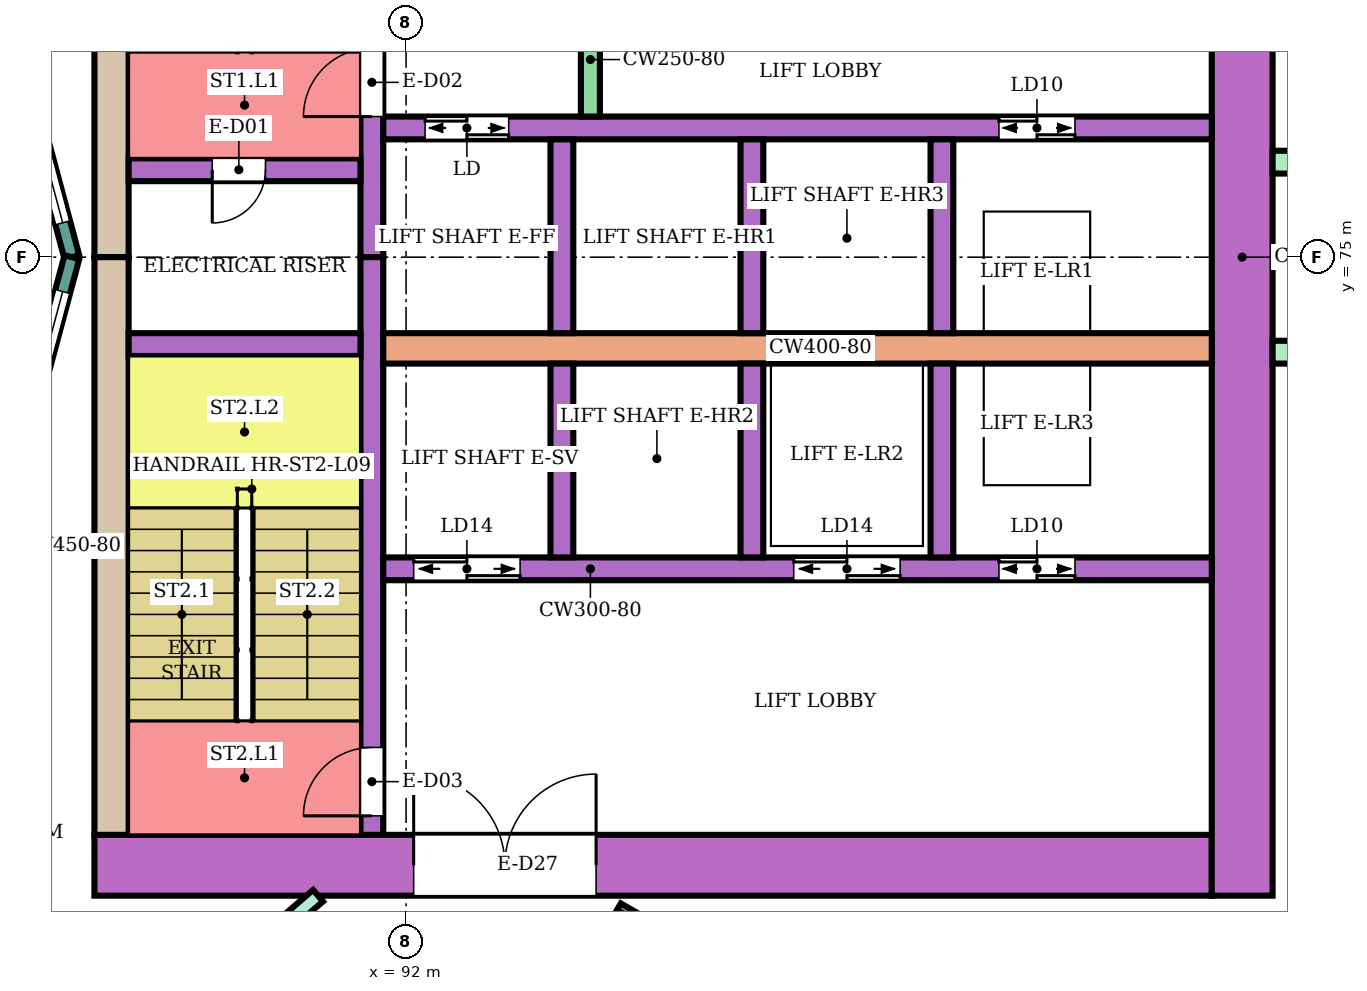
"""IFC4 building model, lengths in metres.
Left out: names, types, materials, properties, quantities, classifications, styles, units other than length and angle.
Written with IfcOpenShell. Run it as: python <this file> out.ifc"""

import sys

from ifc_helpers import new_model, si_unit, direction, frame, frame_2d, origin, place, context, subcontext, project, spatial, rectangle, extrude, element, fill, save


model = new_model("IFC4")
c1 = context("Model", 3, precision=1e-05, world=origin(), true_north=direction((0.0, 1.0)))
c2 = subcontext(c1, "Body", "Model", "MODEL_VIEW")
j1 = project(units=[si_unit("LENGTHUNIT", "METRE"), si_unit("PLANEANGLEUNIT", "RADIAN")], contexts=[c1])
p1 = place(None, origin())
s1 = spatial("IfcSite", under=j1, at=p1, CompositionType="ELEMENT")
p2 = place(p1, origin())
s2 = spatial("IfcBuilding", under=s1, at=p2, CompositionType="ELEMENT")
p3 = place(p2, frame((0.0, 0.0, 44.0)))
s3 = spatial("IfcBuildingStorey", under=s2, at=p3, CompositionType="ELEMENT", Elevation=44.0)
p4 = place(p3, frame((87.9, 67.0, 0.0), z_axis=(0.0, 0.0, 1.0), x_axis=(1.0, 0.0, 0.0)))
e1 = element("IfcWall", 1, at=p4, inside=s3, PredefinedType="SHEAR", context=c2, shape_type="SweptSolid", body=[
    extrude(rectangle(XDim=14.7, YDim=0.8, at=frame_2d((7.35, 0.0))), origin(), (0.0, 0.0, 1.0), 3.48),
])
p5 = place(p4, frame((4.2, 0.0, 0.0)))
e2 = element("IfcOpeningElement", 2, at=p5, cuts=e1, PredefinedType="OPENING", context=c2, shape_type="SweptSolid", body=[
    extrude(rectangle(XDim=2.4, YDim=2.4, at=frame_2d((1.2, 1.2))), frame((0.0, 0.41, 0.0), z_axis=(0.0, -1.0, 0.0), x_axis=(1.0, 0.0, 0.0)), (0.0, 0.0, 1.0), 0.82),
])
for number, where, z_axis, x_axis in (
    (3, (88.125, 75.0, 0.0), (0.0, 0.0, 1.0), (0.0, 1.0, 0.0)),
    (4, (88.125, 67.4, 0.0), (0.0, 0.0, 1.0), (0.0, 1.0, 0.0)),
):
    element("IfcWall", number, at=place(p3, frame(where, z_axis=z_axis, x_axis=x_axis)), inside=s3, PredefinedType="SHEAR", context=c2, shape_type="SweptSolid", body=[
        extrude(rectangle(XDim=7.6, YDim=0.45, at=frame_2d((3.8, 0.0))), origin(), (0.0, 0.0, 1.0), 3.48),
    ])
p6 = place(p3, frame((103.0, 66.6, 0.0), z_axis=(0.0, 0.0, 1.0), x_axis=(0.0, 1.0, 0.0)))
e5 = element("IfcWall", 5, at=p6, inside=s3, PredefinedType="SHEAR", context=c2, shape_type="SweptSolid", body=[
    extrude(rectangle(XDim=16.8, YDim=0.8, at=frame_2d((8.4, 0.0))), origin(), (0.0, 0.0, 1.0), 3.48),
])
p7 = place(p3, frame((91.55, 75.0, 0.0), z_axis=(0.0, 0.0, 1.0), x_axis=(0.0, 1.0, 0.0)))
e6 = element("IfcWall", 6, at=p7, inside=s3, PredefinedType="SHEAR", context=c2, shape_type="SweptSolid", body=[
    extrude(rectangle(XDim=7.6, YDim=0.3, at=frame_2d((3.8, 0.0))), origin(), (0.0, 0.0, 1.0), 3.48),
])
p8 = place(p7, frame((1.85, 0.0, 0.0)))
e7 = element("IfcOpeningElement", 7, at=p8, cuts=e6, PredefinedType="OPENING", context=c2, shape_type="SweptSolid", body=[
    extrude(rectangle(XDim=0.9, YDim=2.1, at=frame_2d((0.45, 1.05))), frame((0.0, 0.16, 0.0), z_axis=(0.0, -1.0, 0.0), x_axis=(1.0, 0.0, 0.0)), (0.0, 0.0, 1.0), 0.32),
])
p9 = place(p3, frame((91.55, 67.4, 0.0), z_axis=(0.0, 0.0, 1.0), x_axis=(0.0, 1.0, 0.0)))
e8 = element("IfcWall", 8, at=p9, inside=s3, PredefinedType="SHEAR", context=c2, shape_type="SweptSolid", body=[
    extrude(rectangle(XDim=7.6, YDim=0.3, at=frame_2d((3.8, 0.0))), origin(), (0.0, 0.0, 1.0), 3.48),
])
p10 = place(p9, frame((0.25, 0.0, 0.0)))
e9 = element("IfcOpeningElement", 9, at=p10, cuts=e8, PredefinedType="OPENING", context=c2, shape_type="SweptSolid", body=[
    extrude(rectangle(XDim=0.9, YDim=2.1, at=frame_2d((0.45, 1.05))), frame((0.0, 0.16, 0.0), z_axis=(0.0, -1.0, 0.0), x_axis=(1.0, 0.0, 0.0)), (0.0, 0.0, 1.0), 0.32),
])
p11 = place(p3, frame((88.35, 76.15, 0.0), z_axis=(0.0, 0.0, 1.0), x_axis=(1.0, 0.0, 0.0)))
e10 = element("IfcWall", 10, at=p11, inside=s3, PredefinedType="SHEAR", context=c2, shape_type="SweptSolid", body=[
    extrude(rectangle(XDim=3.05, YDim=0.3, at=frame_2d((1.525, 0.0))), origin(), (0.0, 0.0, 1.0), 3.48),
])
p12 = place(p11, frame((1.1, 0.0, 0.0)))
e11 = element("IfcOpeningElement", 11, at=p12, cuts=e10, PredefinedType="OPENING", context=c2, shape_type="SweptSolid", body=[
    extrude(rectangle(XDim=0.7, YDim=2.0, at=frame_2d((0.35, 1.0))), frame((0.0, 0.16, 0.0), z_axis=(0.0, -1.0, 0.0), x_axis=(1.0, 0.0, 0.0)), (0.0, 0.0, 1.0), 0.32),
])
p13 = place(p3, frame((88.35, 73.85, 0.0), z_axis=(0.0, 0.0, 1.0), x_axis=(1.0, 0.0, 0.0)))
e12 = element("IfcWall", 12, at=p13, inside=s3, PredefinedType="SHEAR", context=c2, shape_type="SweptSolid", body=[
    extrude(rectangle(XDim=3.05, YDim=0.3, at=frame_2d((1.525, 0.0))), origin(), (0.0, 0.0, 1.0), 3.48),
])
p14 = place(p3, frame((91.7, 76.7, 0.0), z_axis=(0.0, 0.0, 1.0), x_axis=(1.0, 0.0, 0.0)))
e13 = element("IfcWall", 13, at=p14, inside=s3, PredefinedType="SHEAR", context=c2, shape_type="SweptSolid", body=[
    extrude(rectangle(XDim=10.9, YDim=0.3, at=frame_2d((5.45, 0.0))), origin(), (0.0, 0.0, 1.0), 3.48),
])
p15 = place(p14, frame((0.55, 0.0, 0.0)))
e14 = element("IfcOpeningElement", 14, at=p15, cuts=e13, PredefinedType="OPENING", context=c2, shape_type="SweptSolid", body=[
    extrude(rectangle(XDim=1.1, YDim=2.1, at=frame_2d((0.55, 1.05))), frame((0.0, 0.16, 0.0), z_axis=(0.0, -1.0, 0.0), x_axis=(1.0, 0.0, 0.0)), (0.0, 0.0, 1.0), 0.32),
])
p16 = place(p14, frame((8.1, 0.0, 0.0)))
e15 = element("IfcOpeningElement", 15, at=p16, cuts=e13, PredefinedType="OPENING", context=c2, shape_type="SweptSolid", body=[
    extrude(rectangle(XDim=1.0, YDim=2.1, at=frame_2d((0.5, 1.05))), frame((0.0, 0.16, 0.0), z_axis=(0.0, -1.0, 0.0), x_axis=(1.0, 0.0, 0.0)), (0.0, 0.0, 1.0), 0.32),
])
p17 = place(p3, frame((91.7, 73.8, 0.0), z_axis=(0.0, 0.0, 1.0), x_axis=(1.0, 0.0, 0.0)))
e16 = element("IfcWall", 16, at=p17, inside=s3, PredefinedType="SHEAR", context=c2, shape_type="SweptSolid", body=[
    extrude(rectangle(XDim=10.9, YDim=0.4, at=frame_2d((5.45, 0.0))), origin(), (0.0, 0.0, 1.0), 3.48),
])
p18 = place(p3, frame((91.7, 70.9, 0.0), z_axis=(0.0, 0.0, 1.0), x_axis=(1.0, 0.0, 0.0)))
e17 = element("IfcWall", 17, at=p18, inside=s3, PredefinedType="SHEAR", context=c2, shape_type="SweptSolid", body=[
    extrude(rectangle(XDim=10.9, YDim=0.3, at=frame_2d((5.45, 0.0))), origin(), (0.0, 0.0, 1.0), 3.48),
])
p19 = place(p18, frame((0.4, 0.0, 0.0)))
e18 = element("IfcOpeningElement", 18, at=p19, cuts=e17, PredefinedType="OPENING", context=c2, shape_type="SweptSolid", body=[
    extrude(rectangle(XDim=1.4, YDim=2.1, at=frame_2d((0.7, 1.05))), frame((0.0, 0.16, 0.0), z_axis=(0.0, -1.0, 0.0), x_axis=(1.0, 0.0, 0.0)), (0.0, 0.0, 1.0), 0.32),
])
p20 = place(p18, frame((5.4, 0.0, 0.0)))
e19 = element("IfcOpeningElement", 19, at=p20, cuts=e17, PredefinedType="OPENING", context=c2, shape_type="SweptSolid", body=[
    extrude(rectangle(XDim=1.4, YDim=2.1, at=frame_2d((0.7, 1.05))), frame((0.0, 0.16, 0.0), z_axis=(0.0, -1.0, 0.0), x_axis=(1.0, 0.0, 0.0)), (0.0, 0.0, 1.0), 0.32),
])
p21 = place(p18, frame((8.1, 0.0, 0.0)))
e20 = element("IfcOpeningElement", 20, at=p21, cuts=e17, PredefinedType="OPENING", context=c2, shape_type="SweptSolid", body=[
    extrude(rectangle(XDim=1.0, YDim=2.1, at=frame_2d((0.5, 1.05))), frame((0.0, 0.16, 0.0), z_axis=(0.0, -1.0, 0.0), x_axis=(1.0, 0.0, 0.0)), (0.0, 0.0, 1.0), 0.32),
])
for number, where, z_axis, x_axis in (
    (21, (94.05, 74.0, 0.0), (0.0, 0.0, 1.0), (0.0, 1.0, 0.0)),
    (22, (96.55, 74.0, 0.0), (0.0, 0.0, 1.0), (0.0, 1.0, 0.0)),
    (23, (99.05, 74.0, 0.0), (0.0, 0.0, 1.0), (0.0, 1.0, 0.0)),
    (24, (94.05, 71.05, 0.0), (0.0, 0.0, 1.0), (0.0, 1.0, 0.0)),
    (25, (96.55, 71.05, 0.0), (0.0, 0.0, 1.0), (0.0, 1.0, 0.0)),
    (26, (99.05, 71.05, 0.0), (0.0, 0.0, 1.0), (0.0, 1.0, 0.0)),
):
    element("IfcWall", number, at=place(p3, frame(where, z_axis=z_axis, x_axis=x_axis)), inside=s3, PredefinedType="SHEAR", context=c2, shape_type="SweptSolid", body=[
        extrude(rectangle(XDim=2.55, YDim=0.3, at=frame_2d((1.275, 0.0))), origin(), (0.0, 0.0, 1.0), 3.48),
    ])
p22 = place(p3, frame((94.425, 76.85, 0.0), z_axis=(0.0, 0.0, 1.0), x_axis=(0.0, 1.0, 0.0)))
e27 = element("IfcWall", 27, at=p22, inside=s3, PredefinedType="SHEAR", context=c2, shape_type="SweptSolid", body=[
    extrude(rectangle(XDim=1.5, YDim=0.25, at=frame_2d((0.75, 0.0))), origin(), (0.0, 0.0, 1.0), 3.48),
])
for number, where, z_axis, x_axis in (
    (28, (103.4, 73.75, 0.0), (0.0, 0.0, 1.0), (1.0, 0.0, 0.0)),
    (29, (103.4, 76.25, 0.0), (0.0, 0.0, 1.0), (1.0, 0.0, 0.0)),
):
    element("IfcWall", number, at=place(p3, frame(where, z_axis=z_axis, x_axis=x_axis)), inside=s3, PredefinedType="NOTDEFINED", context=c2, shape_type="SweptSolid", body=[
        extrude(rectangle(XDim=2.416, YDim=0.3, at=frame_2d((1.208, 0.0))), origin(), (0.0, 0.0, 1.0), 3.8),
    ])
p23 = place(p3, frame((87.604, 75.0, 0.0), z_axis=(0.0, 0.0, 1.0), x_axis=(-0.258789828301, 0.965933654434, 0.0)))
e30 = element("IfcWall", 30, at=p23, inside=s3, PredefinedType="NOTDEFINED", context=c2, shape_type="SweptSolid", body=[
    extrude(rectangle(XDim=3.936, YDim=0.2, at=frame_2d((1.968, 0.0))), origin(), (0.0, 0.0, 1.0), 3.8),
])
p24 = place(p23, frame((0.468, 0.0, 0.9)))
e31 = element("IfcOpeningElement", 31, at=p24, cuts=e30, PredefinedType="OPENING", context=c2, shape_type="SweptSolid", body=[
    extrude(rectangle(XDim=3.0, YDim=2.3, at=frame_2d((1.5, 1.15))), frame((0.0, 0.11, 0.0), z_axis=(0.0, -1.0, 0.0), x_axis=(1.0, 0.0, 0.0)), (0.0, 0.0, 1.0), 0.22),
])
p25 = place(p3, frame((86.585, 71.198, 0.0), z_axis=(0.0, 0.0, 1.0), x_axis=(0.258789828301, 0.965933654434, 0.0)))
e32 = element("IfcWall", 32, at=p25, inside=s3, PredefinedType="NOTDEFINED", context=c2, shape_type="SweptSolid", body=[
    extrude(rectangle(XDim=3.936, YDim=0.2, at=frame_2d((1.968, 0.0))), origin(), (0.0, 0.0, 1.0), 3.8),
])
p26 = place(p25, frame((0.468, 0.0, 0.9)))
e33 = element("IfcOpeningElement", 33, at=p26, cuts=e32, PredefinedType="OPENING", context=c2, shape_type="SweptSolid", body=[
    extrude(rectangle(XDim=3.0, YDim=2.3, at=frame_2d((1.5, 1.15))), frame((0.0, 0.11, 0.0), z_axis=(0.0, -1.0, 0.0), x_axis=(1.0, 0.0, 0.0)), (0.0, 0.0, 1.0), 0.22),
])
p27 = place(p3, frame((86.877, 63.189, 0.0), z_axis=(0.0, 0.0, 1.0), x_axis=(0.758164888471, 0.652062881853, 0.0)))
e34 = element("IfcWall", 34, at=p27, inside=s3, PredefinedType="PARTITIONING", context=c2, shape_type="SweptSolid", body=[
    extrude(rectangle(XDim=5.23, YDim=0.2, at=frame_2d((2.615, 0.0))), origin(), (0.0, 0.0, 1.0), 3.35),
])
p28 = place(p27, frame((2.63, 0.0, 0.0)))
e35 = element("IfcOpeningElement", 35, at=p28, cuts=e34, PredefinedType="OPENING", context=c2, shape_type="SweptSolid", body=[
    extrude(rectangle(XDim=1.0, YDim=2.1, at=frame_2d((0.5, 1.05))), frame((0.0, 0.11, 0.0), z_axis=(0.0, -1.0, 0.0), x_axis=(1.0, 0.0, 0.0)), (0.0, 0.0, 1.0), 0.22),
])
p29 = place(p3, frame((86.643, 66.681, 0.0), z_axis=(0.0, 0.0, 1.0), x_axis=(0.652264876065, -0.757991115682, 0.0)))
e36 = element("IfcWall", 36, at=p29, inside=s3, PredefinedType="PARTITIONING", context=c2, shape_type="SweptSolid", body=[
    extrude(rectangle(XDim=2.699, YDim=0.1, at=frame_2d((1.35, 0.0))), origin(), (0.0, 0.0, 1.0), 3.35),
])
p30 = place(p29, frame((1.3, 0.0, 0.0)))
e37 = element("IfcOpeningElement", 37, at=p30, cuts=e36, PredefinedType="OPENING", context=c2, shape_type="SweptSolid", body=[
    extrude(rectangle(XDim=0.8, YDim=2.1, at=frame_2d((0.4, 1.05))), frame((0.0, 0.06, 0.0), z_axis=(0.0, -1.0, 0.0), x_axis=(1.0, 0.0, 0.0)), (0.0, 0.0, 1.0), 0.12),
])
p31 = place(p3, frame((94.8, 66.455, 0.0), z_axis=(0.0, 0.0, 1.0), x_axis=(0.86602264145, -0.500004784474, 0.0)))
e38 = element("IfcWall", 38, at=p31, inside=s3, PredefinedType="PARTITIONING", context=c2, shape_type="SweptSolid", body=[
    extrude(rectangle(XDim=8.708, YDim=0.1, at=frame_2d((4.354, 0.0))), origin(), (0.0, 0.0, 1.0), 3.35),
])
p32 = place(p31, frame((3.879, 0.0, 0.0)))
e39 = element("IfcOpeningElement", 39, at=p32, cuts=e38, PredefinedType="OPENING", context=c2, shape_type="SweptSolid", body=[
    extrude(rectangle(XDim=0.9, YDim=2.1, at=frame_2d((0.45, 1.05))), frame((0.0, 0.06, 0.0), z_axis=(0.0, -1.0, 0.0), x_axis=(1.0, 0.0, 0.0)), (0.0, 0.0, 1.0), 0.12),
])
p33 = place(p24, origin())
e40 = element("IfcWindow", 40, at=p33, inside=s3, PartitioningType="SINGLE_PANEL", PredefinedType="WINDOW", context=c2, shape_type="SweptSolid", body=[
    extrude(rectangle(XDim=3.0, YDim=2.3, at=frame_2d((1.5, 1.15))), frame((0.0, 0.03, 0.0), z_axis=(0.0, -1.0, 0.0), x_axis=(1.0, 0.0, 0.0)), (0.0, 0.0, 1.0), 0.06),
])
fill(e31, e40)
p34 = place(p26, origin())
e41 = element("IfcWindow", 41, at=p34, inside=s3, PartitioningType="SINGLE_PANEL", PredefinedType="WINDOW", context=c2, shape_type="SweptSolid", body=[
    extrude(rectangle(XDim=3.0, YDim=2.3, at=frame_2d((1.5, 1.15))), frame((0.0, 0.03, 0.0), z_axis=(0.0, -1.0, 0.0), x_axis=(1.0, 0.0, 0.0)), (0.0, 0.0, 1.0), 0.06),
])
fill(e33, e41)
p35 = place(p12, frame((0.7, 0.0, 0.0), z_axis=(0.0, 0.0, 1.0), x_axis=(-1.0, 0.0, 0.0)))
e42 = element("IfcDoor", 42, at=p35, inside=s3, OperationType="SINGLE_SWING_RIGHT", PredefinedType="DOOR", context=c2, shape_type="SweptSolid", body=[
    extrude(rectangle(XDim=0.7, YDim=2.0, at=frame_2d((0.35, 1.0))), frame((0.0, 0.025, 0.0), z_axis=(0.0, -1.0, 0.0), x_axis=(1.0, 0.0, 0.0)), (0.0, 0.0, 1.0), 0.05),
])
fill(e11, e42)
p36 = place(p8, origin())
e43 = element("IfcDoor", 43, at=p36, inside=s3, OperationType="SINGLE_SWING_LEFT", PredefinedType="DOOR", context=c2, shape_type="SweptSolid", body=[
    extrude(rectangle(XDim=0.9, YDim=2.1, at=frame_2d((0.45, 1.05))), frame((0.0, 0.025, 0.0), z_axis=(0.0, -1.0, 0.0), x_axis=(1.0, 0.0, 0.0)), (0.0, 0.0, 1.0), 0.05),
])
fill(e7, e43)
p37 = place(p10, origin())
e44 = element("IfcDoor", 44, at=p37, inside=s3, OperationType="SINGLE_SWING_LEFT", PredefinedType="DOOR", context=c2, shape_type="SweptSolid", body=[
    extrude(rectangle(XDim=0.9, YDim=2.1, at=frame_2d((0.45, 1.05))), frame((0.0, 0.025, 0.0), z_axis=(0.0, -1.0, 0.0), x_axis=(1.0, 0.0, 0.0)), (0.0, 0.0, 1.0), 0.05),
])
fill(e9, e44)
p38 = place(p15, origin())
e45 = element("IfcDoor", 45, at=p38, inside=s3, OperationType="DOUBLE_DOOR_SLIDING", PredefinedType="DOOR", context=c2, shape_type="SweptSolid", body=[
    extrude(rectangle(XDim=1.1, YDim=2.1, at=frame_2d((0.55, 1.05))), frame((0.0, 0.025, 0.0), z_axis=(0.0, -1.0, 0.0), x_axis=(1.0, 0.0, 0.0)), (0.0, 0.0, 1.0), 0.05),
])
fill(e14, e45)
p39 = place(p16, origin())
e46 = element("IfcDoor", 46, at=p39, inside=s3, OperationType="DOUBLE_DOOR_SLIDING", PredefinedType="DOOR", context=c2, shape_type="SweptSolid", body=[
    extrude(rectangle(XDim=1.0, YDim=2.1, at=frame_2d((0.5, 1.05))), frame((0.0, 0.025, 0.0), z_axis=(0.0, -1.0, 0.0), x_axis=(1.0, 0.0, 0.0)), (0.0, 0.0, 1.0), 0.05),
])
fill(e15, e46)
p40 = place(p19, origin())
e47 = element("IfcDoor", 47, at=p40, inside=s3, OperationType="DOUBLE_DOOR_SLIDING", PredefinedType="DOOR", context=c2, shape_type="SweptSolid", body=[
    extrude(rectangle(XDim=1.4, YDim=2.1, at=frame_2d((0.7, 1.05))), frame((0.0, 0.025, 0.0), z_axis=(0.0, -1.0, 0.0), x_axis=(1.0, 0.0, 0.0)), (0.0, 0.0, 1.0), 0.05),
])
fill(e18, e47)
p41 = place(p20, origin())
e48 = element("IfcDoor", 48, at=p41, inside=s3, OperationType="DOUBLE_DOOR_SLIDING", PredefinedType="DOOR", context=c2, shape_type="SweptSolid", body=[
    extrude(rectangle(XDim=1.4, YDim=2.1, at=frame_2d((0.7, 1.05))), frame((0.0, 0.025, 0.0), z_axis=(0.0, -1.0, 0.0), x_axis=(1.0, 0.0, 0.0)), (0.0, 0.0, 1.0), 0.05),
])
fill(e19, e48)
p42 = place(p21, origin())
e49 = element("IfcDoor", 49, at=p42, inside=s3, OperationType="DOUBLE_DOOR_SLIDING", PredefinedType="DOOR", context=c2, shape_type="SweptSolid", body=[
    extrude(rectangle(XDim=1.0, YDim=2.1, at=frame_2d((0.5, 1.05))), frame((0.0, 0.025, 0.0), z_axis=(0.0, -1.0, 0.0), x_axis=(1.0, 0.0, 0.0)), (0.0, 0.0, 1.0), 0.05),
])
fill(e20, e49)
p43 = place(p5, origin())
e50 = element("IfcDoor", 50, at=p43, inside=s3, OperationType="DOUBLE_DOOR_SINGLE_SWING", PredefinedType="DOOR", context=c2, shape_type="SweptSolid", body=[
    extrude(rectangle(XDim=2.4, YDim=2.4, at=frame_2d((1.2, 1.2))), frame((0.0, 0.025, 0.0), z_axis=(0.0, -1.0, 0.0), x_axis=(1.0, 0.0, 0.0)), (0.0, 0.0, 1.0), 0.05),
])
fill(e2, e50)
save(model, sys.argv[1])
